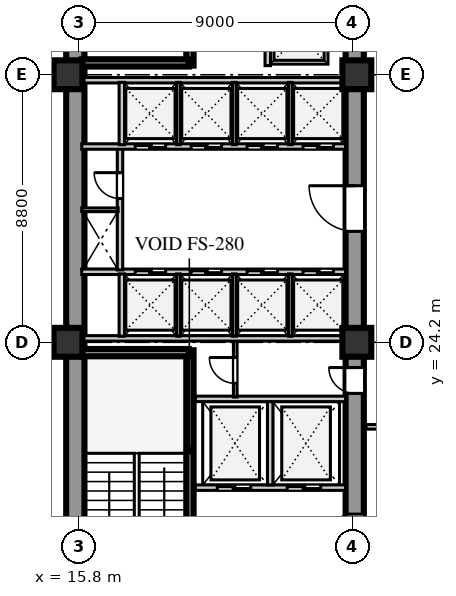
"""IFC4 building model, lengths in metres.
Left out: names, types, materials, properties, quantities, classifications, styles, units other than length and angle.
Written with IfcOpenShell. Run it as: python <this file> out.ifc"""

import sys

from ifc_helpers import new_model, si_unit, direction, frame, frame_2d, origin, origin_2d, place, context, subcontext, project, spatial, rectangle, extrude, element, fill, save


model = new_model("IFC4")
c1 = context("Model", 3, precision=1e-05, world=origin(), true_north=direction((0.0, 1.0)))
c2 = subcontext(c1, "Body", "Model", "MODEL_VIEW")
j1 = project(units=[si_unit("LENGTHUNIT", "METRE"), si_unit("PLANEANGLEUNIT", "RADIAN")], contexts=[c1])
p1 = place(None, origin())
s1 = spatial("IfcSite", under=j1, at=p1, CompositionType="ELEMENT")
p2 = place(p1, origin())
s2 = spatial("IfcBuilding", under=s1, at=p2, CompositionType="ELEMENT")
p3 = place(p2, frame((0.0, 0.0, 50.0)))
s3 = spatial("IfcBuildingStorey", under=s2, at=p3, CompositionType="ELEMENT", Elevation=50.0)
p4 = place(p3, frame((15.69, 15.81, 0.0), z_axis=(0.0, 0.0, 1.0), x_axis=(0.0, 1.0, 0.0)))
e1 = element("IfcWall", 1, at=p4, inside=s3, PredefinedType="SHEAR", context=c2, shape_type="SweptSolid", body=[
    extrude(rectangle(XDim=25.63, YDim=0.6, at=frame_2d((12.815, 0.0))), origin(), (0.0, 0.0, 1.0), 3.72),
])
p5 = place(p3, frame((24.88, 15.74, 0.0), z_axis=(0.0, 0.0, 1.0), x_axis=(0.0, 1.0, 0.0)))
e2 = element("IfcWall", 2, at=p5, inside=s3, PredefinedType="SHEAR", context=c2, shape_type="SweptSolid", body=[
    extrude(rectangle(XDim=25.76, YDim=0.6, at=frame_2d((12.88, 0.0))), origin(), (0.0, 0.0, 1.0), 3.72),
])
p6 = place(p5, frame((1.61, 0.0, 0.0)))
e3 = element("IfcOpeningElement", 3, at=p6, cuts=e2, PredefinedType="OPENING", context=c2, shape_type="SweptSolid", body=[
    extrude(rectangle(XDim=1.2, YDim=2.1, at=frame_2d((0.6, 1.05))), frame((0.0, 0.31, 0.0), z_axis=(0.0, -1.0, 0.0), x_axis=(1.0, 0.0, 0.0)), (0.0, 0.0, 1.0), 0.62),
])
p7 = place(p5, frame((6.78, 0.0, 0.0)))
e4 = element("IfcOpeningElement", 4, at=p7, cuts=e2, PredefinedType="OPENING", context=c2, shape_type="SweptSolid", body=[
    extrude(rectangle(XDim=0.85, YDim=2.06, at=frame_2d((0.425, 1.03))), frame((0.0, 0.31, 0.0), z_axis=(0.0, -1.0, 0.0), x_axis=(1.0, 0.0, 0.0)), (0.0, 0.0, 1.0), 0.62),
])
p8 = place(p5, frame((12.11, 0.0, 0.0)))
e5 = element("IfcOpeningElement", 5, at=p8, cuts=e2, PredefinedType="OPENING", context=c2, shape_type="SweptSolid", body=[
    extrude(rectangle(XDim=1.5, YDim=2.12, at=frame_2d((0.75, 1.06))), frame((0.0, 0.31, 0.0), z_axis=(0.0, -1.0, 0.0), x_axis=(1.0, 0.0, 0.0)), (0.0, 0.0, 1.0), 0.62),
])
p9 = place(p5, frame((20.11, 0.0, 0.0)))
e6 = element("IfcOpeningElement", 6, at=p9, cuts=e2, PredefinedType="OPENING", context=c2, shape_type="SweptSolid", body=[
    extrude(rectangle(XDim=1.2, YDim=2.12, at=frame_2d((0.6, 1.06))), frame((0.0, 0.31, 0.0), z_axis=(0.0, -1.0, 0.0), x_axis=(1.0, 0.0, 0.0)), (0.0, 0.0, 1.0), 0.62),
])
p10 = place(p5, frame((24.01, 0.0, 0.0)))
e7 = element("IfcOpeningElement", 7, at=p10, cuts=e2, PredefinedType="OPENING", context=c2, shape_type="SweptSolid", body=[
    extrude(rectangle(XDim=0.95, YDim=2.1, at=frame_2d((0.475, 1.05))), frame((0.0, 0.31, 0.0), z_axis=(0.0, -1.0, 0.0), x_axis=(1.0, 0.0, 0.0)), (0.0, 0.0, 1.0), 0.62),
])
for number, where, z_axis, x_axis in (
    (8, (15.45, 24.2, 0.0), (0.0, 0.0, 1.0), (1.0, 0.0, 0.0)),
    (9, (15.45, 33.0, 0.0), (0.0, 0.0, 1.0), (1.0, 0.0, 0.0)),
    (10, (24.95, 24.2, 0.0), (0.0, 0.0, 1.0), (1.0, 0.0, 0.0)),
    (11, (24.95, 33.0, 0.0), (0.0, 0.0, 1.0), (1.0, 0.0, 0.0)),
):
    element("IfcColumn", number, at=place(p3, frame(where, z_axis=z_axis, x_axis=x_axis)), inside=s3, PredefinedType="COLUMN", context=c2, shape_type="SweptSolid", body=[
        extrude(rectangle(XDim=0.95, YDim=0.95, at=origin_2d()), origin(), (0.0, 0.0, 1.0), 3.72),
    ])
p11 = place(p3, frame((19.46, 15.74, 0.0), z_axis=(0.0, 0.0, 1.0), x_axis=(0.0, 1.0, 0.0)))
e12 = element("IfcWall", 12, at=p11, inside=s3, PredefinedType="SHEAR", context=c2, shape_type="SweptSolid", body=[
    extrude(rectangle(XDim=8.2, YDim=0.24, at=frame_2d((4.1, 0.0))), origin(), (0.0, 0.0, 1.0), 4.0),
])
p12 = place(p11, frame((0.45, 0.0, 0.0)))
e13 = element("IfcOpeningElement", 13, at=p12, cuts=e12, PredefinedType="OPENING", context=c2, shape_type="SweptSolid", body=[
    extrude(rectangle(XDim=1.1, YDim=2.1, at=frame_2d((0.55, 1.05))), frame((0.0, 0.13, 0.0), z_axis=(0.0, -1.0, 0.0), x_axis=(1.0, 0.0, 0.0)), (0.0, 0.0, 1.0), 0.26),
])
p13 = place(p3, frame((15.9, 23.86, 0.0), z_axis=(0.0, 0.0, 1.0), x_axis=(1.0, 0.0, 0.0)))
e14 = element("IfcWall", 14, at=p13, inside=s3, PredefinedType="SHEAR", context=c2, shape_type="SweptSolid", body=[
    extrude(rectangle(XDim=3.52, YDim=0.24, at=frame_2d((1.76, 0.0))), origin(), (0.0, 0.0, 1.0), 4.0),
])
p14 = place(p3, frame((19.64, 19.42, 0.0), z_axis=(0.0, 0.0, 1.0), x_axis=(1.0, 0.0, 0.0)))
e15 = element("IfcWall", 15, at=p14, inside=s3, PredefinedType="SOLIDWALL", context=c2, shape_type="SweptSolid", body=[
    extrude(rectangle(XDim=4.94, YDim=0.18, at=frame_2d((2.47, 0.0))), origin(), (0.0, 0.0, 1.0), 3.72),
])
p15 = place(p14, frame((0.72, 0.0, 0.0)))
e16 = element("IfcOpeningElement", 16, at=p15, cuts=e15, PredefinedType="OPENING", context=c2, shape_type="SweptSolid", body=[
    extrude(rectangle(XDim=1.1, YDim=2.1, at=frame_2d((0.55, 1.05))), frame((0.0, 0.1, 0.0), z_axis=(0.0, -1.0, 0.0), x_axis=(1.0, 0.0, 0.0)), (0.0, 0.0, 1.0), 0.2),
])
p16 = place(p14, frame((3.02, 0.0, 0.0)))
e17 = element("IfcOpeningElement", 17, at=p16, cuts=e15, PredefinedType="OPENING", context=c2, shape_type="SweptSolid", body=[
    extrude(rectangle(XDim=1.1, YDim=2.1, at=frame_2d((0.55, 1.05))), frame((0.0, 0.1, 0.0), z_axis=(0.0, -1.0, 0.0), x_axis=(1.0, 0.0, 0.0)), (0.0, 0.0, 1.0), 0.2),
])
p17 = place(p3, frame((22.1, 19.51, 0.0), z_axis=(0.0, 0.0, 1.0), x_axis=(0.0, 1.0, 0.0)))
e18 = element("IfcWall", 18, at=p17, inside=s3, PredefinedType="SOLIDWALL", context=c2, shape_type="SweptSolid", body=[
    extrude(rectangle(XDim=2.74, YDim=0.18, at=frame_2d((1.37, 0.0))), origin(), (0.0, 0.0, 1.0), 3.72),
])
p18 = place(p3, frame((19.64, 22.34, 0.0), z_axis=(0.0, 0.0, 1.0), x_axis=(1.0, 0.0, 0.0)))
e19 = element("IfcWall", 19, at=p18, inside=s3, PredefinedType="SOLIDWALL", context=c2, shape_type="SweptSolid", body=[
    extrude(rectangle(XDim=4.94, YDim=0.18, at=frame_2d((2.47, 0.0))), origin(), (0.0, 0.0, 1.0), 3.72),
])
p19 = place(p3, frame((20.95, 22.4, 0.0), z_axis=(0.0, 0.0, 1.0), x_axis=(0.0, 1.0, 0.0)))
e20 = element("IfcWall", 20, at=p19, inside=s3, PredefinedType="PARTITIONING", context=c2, shape_type="SweptSolid", body=[
    extrude(rectangle(XDim=1.88, YDim=0.12, at=frame_2d((0.94, 0.0))), origin(), (0.0, 0.0, 1.0), 3.72),
])
p20 = place(p19, frame((0.45, 0.0, 0.0)))
e21 = element("IfcOpeningElement", 21, at=p20, cuts=e20, PredefinedType="OPENING", context=c2, shape_type="SweptSolid", body=[
    extrude(rectangle(XDim=0.85, YDim=2.06, at=frame_2d((0.425, 1.03))), frame((0.0, 0.07, 0.0), z_axis=(0.0, -1.0, 0.0), x_axis=(1.0, 0.0, 0.0)), (0.0, 0.0, 1.0), 0.14),
])
p21 = place(p3, frame((15.9, 26.52, 0.0), z_axis=(0.0, 0.0, 1.0), x_axis=(1.0, 0.0, 0.0)))
e22 = element("IfcWall", 22, at=p21, inside=s3, PredefinedType="SOLIDWALL", context=c2, shape_type="SweptSolid", body=[
    extrude(rectangle(XDim=8.68, YDim=0.18, at=frame_2d((4.34, 0.0))), origin(), (0.0, 0.0, 1.0), 3.72),
])
p22 = place(p21, frame((1.76, 0.0, 0.0)))
e23 = element("IfcOpeningElement", 23, at=p22, cuts=e22, PredefinedType="OPENING", context=c2, shape_type="SweptSolid", body=[
    extrude(rectangle(XDim=1.0, YDim=2.1, at=frame_2d((0.5, 1.05))), frame((0.0, 0.1, 0.0), z_axis=(0.0, -1.0, 0.0), x_axis=(1.0, 0.0, 0.0)), (0.0, 0.0, 1.0), 0.2),
])
p23 = place(p21, frame((3.6, 0.0, 0.0)))
e24 = element("IfcOpeningElement", 24, at=p23, cuts=e22, PredefinedType="OPENING", context=c2, shape_type="SweptSolid", body=[
    extrude(rectangle(XDim=1.0, YDim=2.1, at=frame_2d((0.5, 1.05))), frame((0.0, 0.1, 0.0), z_axis=(0.0, -1.0, 0.0), x_axis=(1.0, 0.0, 0.0)), (0.0, 0.0, 1.0), 0.2),
])
p24 = place(p21, frame((5.44, 0.0, 0.0)))
e25 = element("IfcOpeningElement", 25, at=p24, cuts=e22, PredefinedType="OPENING", context=c2, shape_type="SweptSolid", body=[
    extrude(rectangle(XDim=1.0, YDim=2.1, at=frame_2d((0.5, 1.05))), frame((0.0, 0.1, 0.0), z_axis=(0.0, -1.0, 0.0), x_axis=(1.0, 0.0, 0.0)), (0.0, 0.0, 1.0), 0.2),
])
p25 = place(p21, frame((7.28, 0.0, 0.0)))
e26 = element("IfcOpeningElement", 26, at=p25, cuts=e22, PredefinedType="OPENING", context=c2, shape_type="SweptSolid", body=[
    extrude(rectangle(XDim=1.0, YDim=2.1, at=frame_2d((0.5, 1.05))), frame((0.0, 0.1, 0.0), z_axis=(0.0, -1.0, 0.0), x_axis=(1.0, 0.0, 0.0)), (0.0, 0.0, 1.0), 0.2),
])
p26 = place(p3, frame((15.9, 24.33, 0.0), z_axis=(0.0, 0.0, 1.0), x_axis=(1.0, 0.0, 0.0)))
e27 = element("IfcWall", 27, at=p26, inside=s3, PredefinedType="SOLIDWALL", context=c2, shape_type="SweptSolid", body=[
    extrude(rectangle(XDim=8.68, YDim=0.18, at=frame_2d((4.34, 0.0))), origin(), (0.0, 0.0, 1.0), 3.02),
])
p27 = place(p3, frame((17.22, 24.4, 0.0), z_axis=(0.0, 0.0, 1.0), x_axis=(0.0, 1.0, 0.0)))
e28 = element("IfcWall", 28, at=p27, inside=s3, PredefinedType="SOLIDWALL", context=c2, shape_type="SweptSolid", body=[
    extrude(rectangle(XDim=2.05, YDim=0.18, at=frame_2d((1.025, 0.0))), origin(), (0.0, 0.0, 1.0), 3.72),
])
for number, where, z_axis, x_axis in (
    (29, (19.08, 24.4, 0.0), (0.0, 0.0, 1.0), (0.0, 1.0, 0.0)),
    (30, (20.92, 24.4, 0.0), (0.0, 0.0, 1.0), (0.0, 1.0, 0.0)),
    (31, (22.76, 24.4, 0.0), (0.0, 0.0, 1.0), (0.0, 1.0, 0.0)),
):
    element("IfcWall", number, at=place(p3, frame(where, z_axis=z_axis, x_axis=x_axis)), inside=s3, PredefinedType="PARTITIONING", context=c2, shape_type="SweptSolid", body=[
        extrude(rectangle(XDim=2.05, YDim=0.12, at=frame_2d((1.025, 0.0))), origin(), (0.0, 0.0, 1.0), 3.72),
    ])
p28 = place(p3, frame((17.16, 26.58, 0.0), z_axis=(0.0, 0.0, 1.0), x_axis=(0.0, 1.0, 0.0)))
e32 = element("IfcWall", 32, at=p28, inside=s3, PredefinedType="SOLIDWALL", context=c2, shape_type="SweptSolid", body=[
    extrude(rectangle(XDim=4.02, YDim=0.18, at=frame_2d((2.01, 0.0))), origin(), (0.0, 0.0, 1.0), 3.72),
])
p29 = place(p28, frame((2.35, 0.0, 0.0)))
e33 = element("IfcOpeningElement", 33, at=p29, cuts=e32, PredefinedType="OPENING", context=c2, shape_type="SweptSolid", body=[
    extrude(rectangle(XDim=0.85, YDim=2.06, at=frame_2d((0.425, 1.03))), frame((0.0, 0.1, 0.0), z_axis=(0.0, -1.0, 0.0), x_axis=(1.0, 0.0, 0.0)), (0.0, 0.0, 1.0), 0.2),
])
p30 = place(p3, frame((15.9, 28.56, 0.0), z_axis=(0.0, 0.0, 1.0), x_axis=(1.0, 0.0, 0.0)))
e34 = element("IfcWall", 34, at=p30, inside=s3, PredefinedType="PARTITIONING", context=c2, shape_type="SweptSolid", body=[
    extrude(rectangle(XDim=1.2, YDim=0.12, at=frame_2d((0.6, 0.0))), origin(), (0.0, 0.0, 1.0), 3.72),
])
p31 = place(p3, frame((15.9, 30.64, 0.0), z_axis=(0.0, 0.0, 1.0), x_axis=(1.0, 0.0, 0.0)))
e35 = element("IfcWall", 35, at=p31, inside=s3, PredefinedType="SOLIDWALL", context=c2, shape_type="SweptSolid", body=[
    extrude(rectangle(XDim=8.68, YDim=0.18, at=frame_2d((4.34, 0.0))), origin(), (0.0, 0.0, 1.0), 3.72),
])
p32 = place(p31, frame((1.76, 0.0, 0.0)))
e36 = element("IfcOpeningElement", 36, at=p32, cuts=e35, PredefinedType="OPENING", context=c2, shape_type="SweptSolid", body=[
    extrude(rectangle(XDim=1.0, YDim=2.1, at=frame_2d((0.5, 1.05))), frame((0.0, 0.1, 0.0), z_axis=(0.0, -1.0, 0.0), x_axis=(1.0, 0.0, 0.0)), (0.0, 0.0, 1.0), 0.2),
])
p33 = place(p31, frame((3.6, 0.0, 0.0)))
e37 = element("IfcOpeningElement", 37, at=p33, cuts=e35, PredefinedType="OPENING", context=c2, shape_type="SweptSolid", body=[
    extrude(rectangle(XDim=1.0, YDim=2.1, at=frame_2d((0.5, 1.05))), frame((0.0, 0.1, 0.0), z_axis=(0.0, -1.0, 0.0), x_axis=(1.0, 0.0, 0.0)), (0.0, 0.0, 1.0), 0.2),
])
p34 = place(p31, frame((5.44, 0.0, 0.0)))
e38 = element("IfcOpeningElement", 38, at=p34, cuts=e35, PredefinedType="OPENING", context=c2, shape_type="SweptSolid", body=[
    extrude(rectangle(XDim=1.0, YDim=2.1, at=frame_2d((0.5, 1.05))), frame((0.0, 0.1, 0.0), z_axis=(0.0, -1.0, 0.0), x_axis=(1.0, 0.0, 0.0)), (0.0, 0.0, 1.0), 0.2),
])
p35 = place(p31, frame((7.28, 0.0, 0.0)))
e39 = element("IfcOpeningElement", 39, at=p35, cuts=e35, PredefinedType="OPENING", context=c2, shape_type="SweptSolid", body=[
    extrude(rectangle(XDim=1.0, YDim=2.1, at=frame_2d((0.5, 1.05))), frame((0.0, 0.1, 0.0), z_axis=(0.0, -1.0, 0.0), x_axis=(1.0, 0.0, 0.0)), (0.0, 0.0, 1.0), 0.2),
])
p36 = place(p3, frame((15.9, 32.82, 0.0), z_axis=(0.0, 0.0, 1.0), x_axis=(1.0, 0.0, 0.0)))
e40 = element("IfcWall", 40, at=p36, inside=s3, PredefinedType="SOLIDWALL", context=c2, shape_type="SweptSolid", body=[
    extrude(rectangle(XDim=8.68, YDim=0.18, at=frame_2d((4.34, 0.0))), origin(), (0.0, 0.0, 1.0), 3.02),
])
p37 = place(p3, frame((17.22, 30.7, 0.0), z_axis=(0.0, 0.0, 1.0), x_axis=(0.0, 1.0, 0.0)))
e41 = element("IfcWall", 41, at=p37, inside=s3, PredefinedType="SOLIDWALL", context=c2, shape_type="SweptSolid", body=[
    extrude(rectangle(XDim=2.05, YDim=0.18, at=frame_2d((1.025, 0.0))), origin(), (0.0, 0.0, 1.0), 3.72),
])
for number, where, z_axis, x_axis in (
    (42, (19.08, 30.7, 0.0), (0.0, 0.0, 1.0), (0.0, 1.0, 0.0)),
    (43, (20.92, 30.7, 0.0), (0.0, 0.0, 1.0), (0.0, 1.0, 0.0)),
    (44, (22.76, 30.7, 0.0), (0.0, 0.0, 1.0), (0.0, 1.0, 0.0)),
):
    element("IfcWall", number, at=place(p3, frame(where, z_axis=z_axis, x_axis=x_axis)), inside=s3, PredefinedType="PARTITIONING", context=c2, shape_type="SweptSolid", body=[
        extrude(rectangle(XDim=2.05, YDim=0.12, at=frame_2d((1.025, 0.0))), origin(), (0.0, 0.0, 1.0), 3.72),
    ])
p38 = place(p3, frame((19.46, 33.3, 0.0), z_axis=(0.0, 0.0, 1.0), x_axis=(0.0, 1.0, 0.0)))
e45 = element("IfcWall", 45, at=p38, inside=s3, PredefinedType="SHEAR", context=c2, shape_type="SweptSolid", body=[
    extrude(rectangle(XDim=8.18, YDim=0.24, at=frame_2d((4.09, 0.0))), origin(), (0.0, 0.0, 1.0), 4.0),
])
p39 = place(p38, frame((0.65, 0.0, 0.0)))
e46 = element("IfcOpeningElement", 46, at=p39, cuts=e45, PredefinedType="OPENING", context=c2, shape_type="SweptSolid", body=[
    extrude(rectangle(XDim=1.1, YDim=2.1, at=frame_2d((0.55, 1.05))), frame((0.0, 0.13, 0.0), z_axis=(0.0, -1.0, 0.0), x_axis=(1.0, 0.0, 0.0)), (0.0, 0.0, 1.0), 0.26),
])
p40 = place(p3, frame((15.9, 33.39, 0.0), z_axis=(0.0, 0.0, 1.0), x_axis=(1.0, 0.0, 0.0)))
e47 = element("IfcWall", 47, at=p40, inside=s3, PredefinedType="SHEAR", context=c2, shape_type="SweptSolid", body=[
    extrude(rectangle(XDim=3.52, YDim=0.24, at=frame_2d((1.76, 0.0))), origin(), (0.0, 0.0, 1.0), 4.0),
])
p41 = place(p3, frame((22.02, 33.3, 0.0), z_axis=(0.0, 0.0, 1.0), x_axis=(0.0, 1.0, 0.0)))
e48 = element("IfcWall", 48, at=p41, inside=s3, PredefinedType="SOLIDWALL", context=c2, shape_type="SweptSolid", body=[
    extrude(rectangle(XDim=2.01, YDim=0.18, at=frame_2d((1.005, 0.0))), origin(), (0.0, 0.0, 1.0), 3.72),
])
p42 = place(p3, frame((25.25, 21.42, 0.0), z_axis=(0.0, 0.0, 1.0), x_axis=(1.0, 0.0, 0.0)))
e49 = element("IfcWall", 49, at=p42, inside=s3, PredefinedType="PARTITIONING", context=c2, shape_type="SweptSolid", body=[
    extrude(rectangle(XDim=12.87, YDim=0.15, at=frame_2d((6.435, 0.0))), origin(), (0.0, 0.0, 1.0), 3.32),
])
p43 = place(p42, frame((1.525, 0.0, 0.0)))
e50 = element("IfcOpeningElement", 50, at=p43, cuts=e49, PredefinedType="OPENING", context=c2, shape_type="SweptSolid", body=[
    extrude(rectangle(XDim=0.95, YDim=2.08, at=frame_2d((0.475, 1.04))), frame((0.0, 0.085, 0.0), z_axis=(0.0, -1.0, 0.0), x_axis=(1.0, 0.0, 0.0)), (0.0, 0.0, 1.0), 0.17),
])
p44 = place(p42, frame((5.775, 0.0, 0.0)))
e51 = element("IfcOpeningElement", 51, at=p44, cuts=e49, PredefinedType="OPENING", context=c2, shape_type="SweptSolid", body=[
    extrude(rectangle(XDim=0.95, YDim=2.08, at=frame_2d((0.475, 1.04))), frame((0.0, 0.085, 0.0), z_axis=(0.0, -1.0, 0.0), x_axis=(1.0, 0.0, 0.0)), (0.0, 0.0, 1.0), 0.17),
])
p45 = place(p42, frame((10.195, 0.0, 0.0)))
e52 = element("IfcOpeningElement", 52, at=p45, cuts=e49, PredefinedType="OPENING", context=c2, shape_type="SweptSolid", body=[
    extrude(rectangle(XDim=0.95, YDim=2.08, at=frame_2d((0.475, 1.04))), frame((0.0, 0.085, 0.0), z_axis=(0.0, -1.0, 0.0), x_axis=(1.0, 0.0, 0.0)), (0.0, 0.0, 1.0), 0.17),
])
p46 = place(p15, origin())
e53 = element("IfcDoor", 53, at=p46, inside=s3, OperationType="DOUBLE_DOOR_SLIDING", PredefinedType="DOOR", context=c2, shape_type="SweptSolid", body=[
    extrude(rectangle(XDim=1.1, YDim=2.1, at=frame_2d((0.55, 1.05))), frame((0.0, 0.025, 0.0), z_axis=(0.0, -1.0, 0.0), x_axis=(1.0, 0.0, 0.0)), (0.0, 0.0, 1.0), 0.05),
])
fill(e16, e53)
p47 = place(p16, origin())
e54 = element("IfcDoor", 54, at=p47, inside=s3, OperationType="DOUBLE_DOOR_SLIDING", PredefinedType="DOOR", context=c2, shape_type="SweptSolid", body=[
    extrude(rectangle(XDim=1.1, YDim=2.1, at=frame_2d((0.55, 1.05))), frame((0.0, 0.025, 0.0), z_axis=(0.0, -1.0, 0.0), x_axis=(1.0, 0.0, 0.0)), (0.0, 0.0, 1.0), 0.05),
])
fill(e17, e54)
p48 = place(p6, frame((1.2, 0.0, 0.0), z_axis=(0.0, 0.0, 1.0), x_axis=(-1.0, 0.0, 0.0)))
e55 = element("IfcDoor", 55, at=p48, inside=s3, OperationType="SINGLE_SWING_RIGHT", PredefinedType="DOOR", context=c2, shape_type="SweptSolid", body=[
    extrude(rectangle(XDim=1.2, YDim=2.1, at=frame_2d((0.6, 1.05))), frame((0.0, 0.025, 0.0), z_axis=(0.0, -1.0, 0.0), x_axis=(1.0, 0.0, 0.0)), (0.0, 0.0, 1.0), 0.05),
])
fill(e3, e55)
p49 = place(p20, origin())
e56 = element("IfcDoor", 56, at=p49, inside=s3, OperationType="SINGLE_SWING_RIGHT", PredefinedType="DOOR", context=c2, shape_type="SweptSolid", body=[
    extrude(rectangle(XDim=0.85, YDim=2.06, at=frame_2d((0.425, 1.03))), frame((0.0, 0.025, 0.0), z_axis=(0.0, -1.0, 0.0), x_axis=(1.0, 0.0, 0.0)), (0.0, 0.0, 1.0), 0.05),
])
fill(e21, e56)
p50 = place(p7, frame((0.85, 0.0, 0.0), z_axis=(0.0, 0.0, 1.0), x_axis=(-1.0, 0.0, 0.0)))
e57 = element("IfcDoor", 57, at=p50, inside=s3, OperationType="SINGLE_SWING_LEFT", PredefinedType="DOOR", context=c2, shape_type="SweptSolid", body=[
    extrude(rectangle(XDim=0.85, YDim=2.06, at=frame_2d((0.425, 1.03))), frame((0.0, 0.025, 0.0), z_axis=(0.0, -1.0, 0.0), x_axis=(1.0, 0.0, 0.0)), (0.0, 0.0, 1.0), 0.05),
])
fill(e4, e57)
p51 = place(p22, origin())
e58 = element("IfcDoor", 58, at=p51, inside=s3, OperationType="DOUBLE_DOOR_SLIDING", PredefinedType="DOOR", context=c2, shape_type="SweptSolid", body=[
    extrude(rectangle(XDim=1.0, YDim=2.1, at=frame_2d((0.5, 1.05))), frame((0.0, 0.025, 0.0), z_axis=(0.0, -1.0, 0.0), x_axis=(1.0, 0.0, 0.0)), (0.0, 0.0, 1.0), 0.05),
])
fill(e23, e58)
p52 = place(p23, origin())
e59 = element("IfcDoor", 59, at=p52, inside=s3, OperationType="DOUBLE_DOOR_SLIDING", PredefinedType="DOOR", context=c2, shape_type="SweptSolid", body=[
    extrude(rectangle(XDim=1.0, YDim=2.1, at=frame_2d((0.5, 1.05))), frame((0.0, 0.025, 0.0), z_axis=(0.0, -1.0, 0.0), x_axis=(1.0, 0.0, 0.0)), (0.0, 0.0, 1.0), 0.05),
])
fill(e24, e59)
p53 = place(p24, origin())
e60 = element("IfcDoor", 60, at=p53, inside=s3, OperationType="DOUBLE_DOOR_SLIDING", PredefinedType="DOOR", context=c2, shape_type="SweptSolid", body=[
    extrude(rectangle(XDim=1.0, YDim=2.1, at=frame_2d((0.5, 1.05))), frame((0.0, 0.025, 0.0), z_axis=(0.0, -1.0, 0.0), x_axis=(1.0, 0.0, 0.0)), (0.0, 0.0, 1.0), 0.05),
])
fill(e25, e60)
p54 = place(p25, origin())
e61 = element("IfcDoor", 61, at=p54, inside=s3, OperationType="DOUBLE_DOOR_SLIDING", PredefinedType="DOOR", context=c2, shape_type="SweptSolid", body=[
    extrude(rectangle(XDim=1.0, YDim=2.1, at=frame_2d((0.5, 1.05))), frame((0.0, 0.025, 0.0), z_axis=(0.0, -1.0, 0.0), x_axis=(1.0, 0.0, 0.0)), (0.0, 0.0, 1.0), 0.05),
])
fill(e26, e61)
p55 = place(p29, origin())
e62 = element("IfcDoor", 62, at=p55, inside=s3, OperationType="SINGLE_SWING_RIGHT", PredefinedType="DOOR", context=c2, shape_type="SweptSolid", body=[
    extrude(rectangle(XDim=0.85, YDim=2.06, at=frame_2d((0.425, 1.03))), frame((0.0, 0.025, 0.0), z_axis=(0.0, -1.0, 0.0), x_axis=(1.0, 0.0, 0.0)), (0.0, 0.0, 1.0), 0.05),
])
fill(e33, e62)
p56 = place(p8, frame((1.5, 0.0, 0.0), z_axis=(0.0, 0.0, 1.0), x_axis=(-1.0, 0.0, 0.0)))
e63 = element("IfcDoor", 63, at=p56, inside=s3, OperationType="SINGLE_SWING_LEFT", PredefinedType="DOOR", context=c2, shape_type="SweptSolid", body=[
    extrude(rectangle(XDim=1.5, YDim=2.12, at=frame_2d((0.75, 1.06))), frame((0.0, 0.025, 0.0), z_axis=(0.0, -1.0, 0.0), x_axis=(1.0, 0.0, 0.0)), (0.0, 0.0, 1.0), 0.05),
])
fill(e5, e63)
p57 = place(p32, frame((1.0, 0.0, 0.0), z_axis=(0.0, 0.0, 1.0), x_axis=(-1.0, 0.0, 0.0)))
e64 = element("IfcDoor", 64, at=p57, inside=s3, OperationType="DOUBLE_DOOR_SLIDING", PredefinedType="DOOR", context=c2, shape_type="SweptSolid", body=[
    extrude(rectangle(XDim=1.0, YDim=2.1, at=frame_2d((0.5, 1.05))), frame((0.0, 0.025, 0.0), z_axis=(0.0, -1.0, 0.0), x_axis=(1.0, 0.0, 0.0)), (0.0, 0.0, 1.0), 0.05),
])
fill(e36, e64)
p58 = place(p33, frame((1.0, 0.0, 0.0), z_axis=(0.0, 0.0, 1.0), x_axis=(-1.0, 0.0, 0.0)))
e65 = element("IfcDoor", 65, at=p58, inside=s3, OperationType="DOUBLE_DOOR_SLIDING", PredefinedType="DOOR", context=c2, shape_type="SweptSolid", body=[
    extrude(rectangle(XDim=1.0, YDim=2.1, at=frame_2d((0.5, 1.05))), frame((0.0, 0.025, 0.0), z_axis=(0.0, -1.0, 0.0), x_axis=(1.0, 0.0, 0.0)), (0.0, 0.0, 1.0), 0.05),
])
fill(e37, e65)
p59 = place(p34, frame((1.0, 0.0, 0.0), z_axis=(0.0, 0.0, 1.0), x_axis=(-1.0, 0.0, 0.0)))
e66 = element("IfcDoor", 66, at=p59, inside=s3, OperationType="DOUBLE_DOOR_SLIDING", PredefinedType="DOOR", context=c2, shape_type="SweptSolid", body=[
    extrude(rectangle(XDim=1.0, YDim=2.1, at=frame_2d((0.5, 1.05))), frame((0.0, 0.025, 0.0), z_axis=(0.0, -1.0, 0.0), x_axis=(1.0, 0.0, 0.0)), (0.0, 0.0, 1.0), 0.05),
])
fill(e38, e66)
p60 = place(p35, frame((1.0, 0.0, 0.0), z_axis=(0.0, 0.0, 1.0), x_axis=(-1.0, 0.0, 0.0)))
e67 = element("IfcDoor", 67, at=p60, inside=s3, OperationType="DOUBLE_DOOR_SLIDING", PredefinedType="DOOR", context=c2, shape_type="SweptSolid", body=[
    extrude(rectangle(XDim=1.0, YDim=2.1, at=frame_2d((0.5, 1.05))), frame((0.0, 0.025, 0.0), z_axis=(0.0, -1.0, 0.0), x_axis=(1.0, 0.0, 0.0)), (0.0, 0.0, 1.0), 0.05),
])
fill(e39, e67)
save(model, sys.argv[1])
